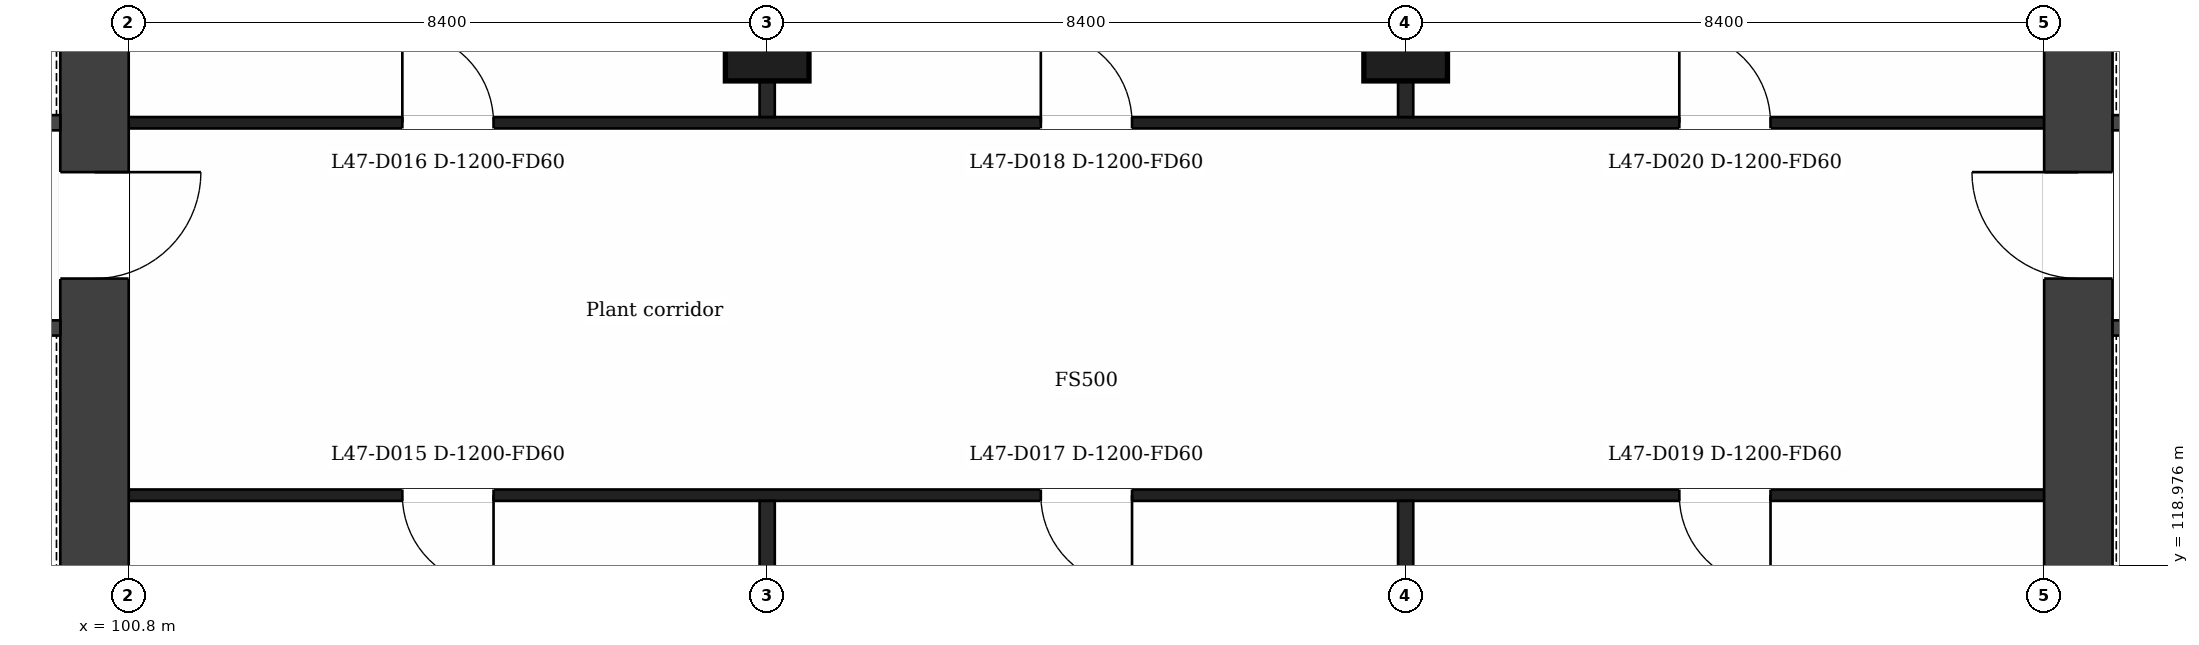
"""IFC4 building model, lengths in metres.
Left out: names, types, materials, properties, quantities, classifications, styles, units other than length and angle.
Written with IfcOpenShell. Run it as: python <this file> out.ifc"""

import sys

from ifc_helpers import new_model, si_unit, direction, frame, frame_2d, origin, origin_2d, place, context, subcontext, project, spatial, rectangle, extrude, element, fill, save


model = new_model("IFC4")
c1 = context("Model", 3, precision=1e-05, world=origin(), true_north=direction((0.0, 1.0)))
c2 = subcontext(c1, "Body", "Model", "MODEL_VIEW")
j1 = project(units=[si_unit("LENGTHUNIT", "METRE"), si_unit("PLANEANGLEUNIT", "RADIAN")], contexts=[c1])
p1 = place(None, origin())
s1 = spatial("IfcSite", under=j1, at=p1, CompositionType="ELEMENT")
p2 = place(p1, origin())
s2 = spatial("IfcBuilding", under=s1, at=p2, CompositionType="ELEMENT")
p3 = place(p2, frame((0.0, 0.0, 197.2)))
s3 = spatial("IfcBuildingStorey", under=s2, at=p3, CompositionType="ELEMENT", Elevation=197.2)
p4 = place(p3, frame((100.35, 131.95, 0.0), z_axis=(0.0, 0.0, 1.0), x_axis=(0.0, -1.0, 0.0)))
e1 = element("IfcWall", 1, at=p4, inside=s3, PredefinedType="SHEAR", context=c2, shape_type="SweptSolid", body=[
    extrude(rectangle(XDim=21.1, YDim=0.9, at=frame_2d((10.55, 0.0))), origin(), (0.0, 0.0, 1.0), 5.0),
])
p5 = place(p4, frame((2.35, 0.0, 0.0)))
e2 = element("IfcOpeningElement", 2, at=p5, cuts=e1, PredefinedType="OPENING", context=c2, shape_type="SweptSolid", body=[
    extrude(rectangle(XDim=1.2, YDim=2.1, at=frame_2d((0.6, 1.05))), frame((0.0, 0.46, 0.0), z_axis=(0.0, -1.0, 0.0), x_axis=(1.0, 0.0, 0.0)), (0.0, 0.0, 1.0), 0.92),
])
p6 = place(p4, frame((7.8, 0.0, 0.0)))
e3 = element("IfcOpeningElement", 3, at=p6, cuts=e1, PredefinedType="OPENING", context=c2, shape_type="SweptSolid", body=[
    extrude(rectangle(XDim=1.4, YDim=2.1, at=frame_2d((0.7, 1.05))), frame((0.0, 0.46, 0.0), z_axis=(0.0, -1.0, 0.0), x_axis=(1.0, 0.0, 0.0)), (0.0, 0.0, 1.0), 0.92),
])
p7 = place(p3, frame((126.45, 110.85, 0.0), z_axis=(0.0, 0.0, 1.0), x_axis=(0.0, 1.0, 0.0)))
e4 = element("IfcWall", 4, at=p7, inside=s3, PredefinedType="SHEAR", context=c2, shape_type="SweptSolid", body=[
    extrude(rectangle(XDim=21.1, YDim=0.9, at=frame_2d((10.55, 0.0))), origin(), (0.0, 0.0, 1.0), 5.0),
])
p8 = place(p7, frame((1.05, 0.0, 0.0)))
e5 = element("IfcOpeningElement", 5, at=p8, cuts=e4, PredefinedType="OPENING", context=c2, shape_type="SweptSolid", body=[
    extrude(rectangle(XDim=1.2, YDim=2.1, at=frame_2d((0.6, 1.05))), frame((0.0, 0.46, 0.0), z_axis=(0.0, -1.0, 0.0), x_axis=(1.0, 0.0, 0.0)), (0.0, 0.0, 1.0), 0.92),
])
p9 = place(p7, frame((11.9, 0.0, 0.0)))
e6 = element("IfcOpeningElement", 6, at=p9, cuts=e4, PredefinedType="OPENING", context=c2, shape_type="SweptSolid", body=[
    extrude(rectangle(XDim=1.4, YDim=2.1, at=frame_2d((0.7, 1.05))), frame((0.0, 0.46, 0.0), z_axis=(0.0, -1.0, 0.0), x_axis=(1.0, 0.0, 0.0)), (0.0, 0.0, 1.0), 0.92),
])
for number, where, z_axis, x_axis in (
    (7, (109.2, 125.9, 0.0), (0.0, 0.0, 1.0), (1.0, 0.0, 0.0)),
    (8, (117.6, 125.9, 0.0), (0.0, 0.0, 1.0), (1.0, 0.0, 0.0)),
):
    element("IfcColumn", number, at=place(p3, frame(where, z_axis=z_axis, x_axis=x_axis)), inside=s3, PredefinedType="COLUMN", context=c2, shape_type="SweptSolid", body=[
        extrude(rectangle(XDim=1.1, YDim=1.1, at=origin_2d()), origin(), (0.0, 0.0, 1.0), 5.0),
    ])
p10 = place(p3, frame((100.8, 119.9, 0.0), z_axis=(0.0, 0.0, 1.0), x_axis=(1.0, 0.0, 0.0)))
e9 = element("IfcWall", 9, at=p10, inside=s3, PredefinedType="PARTITIONING", context=c2, shape_type="SweptSolid", body=[
    extrude(rectangle(XDim=25.2, YDim=0.15, at=frame_2d((12.6, 0.0))), origin(), (0.0, 0.0, 1.0), 4.68),
])
p11 = place(p10, frame((3.6, 0.0, 0.0)))
e10 = element("IfcOpeningElement", 10, at=p11, cuts=e9, PredefinedType="OPENING", context=c2, shape_type="SweptSolid", body=[
    extrude(rectangle(XDim=1.2, YDim=2.1, at=frame_2d((0.6, 1.05))), frame((0.0, 0.085, 0.0), z_axis=(0.0, -1.0, 0.0), x_axis=(1.0, 0.0, 0.0)), (0.0, 0.0, 1.0), 0.17),
])
p12 = place(p10, frame((12.0, 0.0, 0.0)))
e11 = element("IfcOpeningElement", 11, at=p12, cuts=e9, PredefinedType="OPENING", context=c2, shape_type="SweptSolid", body=[
    extrude(rectangle(XDim=1.2, YDim=2.1, at=frame_2d((0.6, 1.05))), frame((0.0, 0.085, 0.0), z_axis=(0.0, -1.0, 0.0), x_axis=(1.0, 0.0, 0.0)), (0.0, 0.0, 1.0), 0.17),
])
p13 = place(p10, frame((20.4, 0.0, 0.0)))
e12 = element("IfcOpeningElement", 12, at=p13, cuts=e9, PredefinedType="OPENING", context=c2, shape_type="SweptSolid", body=[
    extrude(rectangle(XDim=1.2, YDim=2.1, at=frame_2d((0.6, 1.05))), frame((0.0, 0.085, 0.0), z_axis=(0.0, -1.0, 0.0), x_axis=(1.0, 0.0, 0.0)), (0.0, 0.0, 1.0), 0.17),
])
p14 = place(p3, frame((95.227, 122.1, 0.0), z_axis=(0.0, 0.0, 1.0), x_axis=(1.0, 0.0, 0.0)))
e13 = element("IfcWall", 13, at=p14, inside=s3, PredefinedType="PARTITIONING", context=c2, shape_type="SweptSolid", body=[
    extrude(rectangle(XDim=4.673, YDim=0.2, at=frame_2d((2.336, 0.0))), origin(), (0.0, 0.0, 1.0), 4.68),
])
p15 = place(p14, frame((0.618, 0.0, 0.0)))
e14 = element("IfcOpeningElement", 14, at=p15, cuts=e13, PredefinedType="OPENING", context=c2, shape_type="SweptSolid", body=[
    extrude(rectangle(XDim=1.1, YDim=2.1, at=frame_2d((0.55, 1.05))), frame((0.0, 0.11, 0.0), z_axis=(0.0, -1.0, 0.0), x_axis=(1.0, 0.0, 0.0)), (0.0, 0.0, 1.0), 0.22),
])
p16 = place(p14, frame((3.089, 0.0, 0.0)))
e15 = element("IfcOpeningElement", 15, at=p16, cuts=e13, PredefinedType="OPENING", context=c2, shape_type="SweptSolid", body=[
    extrude(rectangle(XDim=1.1, YDim=2.1, at=frame_2d((0.55, 1.05))), frame((0.0, 0.11, 0.0), z_axis=(0.0, -1.0, 0.0), x_axis=(1.0, 0.0, 0.0)), (0.0, 0.0, 1.0), 0.22),
])
p17 = place(p3, frame((126.9, 122.1, 0.0), z_axis=(0.0, 0.0, 1.0), x_axis=(1.0, 0.0, 0.0)))
e16 = element("IfcWall", 16, at=p17, inside=s3, PredefinedType="PARTITIONING", context=c2, shape_type="SweptSolid", body=[
    extrude(rectangle(XDim=4.673, YDim=0.2, at=frame_2d((2.336, 0.0))), origin(), (0.0, 0.0, 1.0), 4.68),
])
p18 = place(p17, frame((2.901, 0.0, 0.0)))
e17 = element("IfcOpeningElement", 17, at=p18, cuts=e16, PredefinedType="OPENING", context=c2, shape_type="SweptSolid", body=[
    extrude(rectangle(XDim=1.1, YDim=2.1, at=frame_2d((0.55, 1.05))), frame((0.0, 0.11, 0.0), z_axis=(0.0, -1.0, 0.0), x_axis=(1.0, 0.0, 0.0)), (0.0, 0.0, 1.0), 0.22),
])
p19 = place(p17, frame((0.752, 0.0, 0.0)))
e18 = element("IfcOpeningElement", 18, at=p19, cuts=e16, PredefinedType="OPENING", context=c2, shape_type="SweptSolid", body=[
    extrude(rectangle(XDim=1.1, YDim=2.1, at=frame_2d((0.55, 1.05))), frame((0.0, 0.11, 0.0), z_axis=(0.0, -1.0, 0.0), x_axis=(1.0, 0.0, 0.0)), (0.0, 0.0, 1.0), 0.22),
])
p20 = place(p3, frame((92.702, 124.8, 0.0), z_axis=(0.0, 0.0, 1.0), x_axis=(1.0, 0.0, 0.0)))
e19 = element("IfcWall", 19, at=p20, inside=s3, PredefinedType="PARTITIONING", context=c2, shape_type="SweptSolid", body=[
    extrude(rectangle(XDim=7.198, YDim=0.2, at=frame_2d((3.599, 0.0))), origin(), (0.0, 0.0, 1.0), 4.68),
])
p21 = place(p20, frame((5.469, 0.0, 0.0)))
e20 = element("IfcOpeningElement", 20, at=p21, cuts=e19, PredefinedType="OPENING", context=c2, shape_type="SweptSolid", body=[
    extrude(rectangle(XDim=1.1, YDim=2.1, at=frame_2d((0.55, 1.05))), frame((0.0, 0.11, 0.0), z_axis=(0.0, -1.0, 0.0), x_axis=(1.0, 0.0, 0.0)), (0.0, 0.0, 1.0), 0.22),
])
p22 = place(p3, frame((126.9, 124.8, 0.0), z_axis=(0.0, 0.0, 1.0), x_axis=(1.0, 0.0, 0.0)))
e21 = element("IfcWall", 21, at=p22, inside=s3, PredefinedType="PARTITIONING", context=c2, shape_type="SweptSolid", body=[
    extrude(rectangle(XDim=4.715, YDim=0.2, at=frame_2d((2.358, 0.0))), origin(), (0.0, 0.0, 1.0), 4.68),
])
p23 = place(p22, frame((0.573, 0.0, 0.0)))
e22 = element("IfcOpeningElement", 22, at=p23, cuts=e21, PredefinedType="OPENING", context=c2, shape_type="SweptSolid", body=[
    extrude(rectangle(XDim=1.1, YDim=2.1, at=frame_2d((0.55, 1.05))), frame((0.0, 0.11, 0.0), z_axis=(0.0, -1.0, 0.0), x_axis=(1.0, 0.0, 0.0)), (0.0, 0.0, 1.0), 0.22),
])
p24 = place(p3, frame((100.8, 124.8, 0.0), z_axis=(0.0, 0.0, 1.0), x_axis=(1.0, 0.0, 0.0)))
e23 = element("IfcWall", 23, at=p24, inside=s3, PredefinedType="PARTITIONING", context=c2, shape_type="SweptSolid", body=[
    extrude(rectangle(XDim=25.2, YDim=0.15, at=frame_2d((12.6, 0.0))), origin(), (0.0, 0.0, 1.0), 4.68),
])
p25 = place(p24, frame((3.6, 0.0, 0.0)))
e24 = element("IfcOpeningElement", 24, at=p25, cuts=e23, PredefinedType="OPENING", context=c2, shape_type="SweptSolid", body=[
    extrude(rectangle(XDim=1.2, YDim=2.1, at=frame_2d((0.6, 1.05))), frame((0.0, 0.085, 0.0), z_axis=(0.0, -1.0, 0.0), x_axis=(1.0, 0.0, 0.0)), (0.0, 0.0, 1.0), 0.17),
])
p26 = place(p24, frame((12.0, 0.0, 0.0)))
e25 = element("IfcOpeningElement", 25, at=p26, cuts=e23, PredefinedType="OPENING", context=c2, shape_type="SweptSolid", body=[
    extrude(rectangle(XDim=1.2, YDim=2.1, at=frame_2d((0.6, 1.05))), frame((0.0, 0.085, 0.0), z_axis=(0.0, -1.0, 0.0), x_axis=(1.0, 0.0, 0.0)), (0.0, 0.0, 1.0), 0.17),
])
p27 = place(p24, frame((20.4, 0.0, 0.0)))
e26 = element("IfcOpeningElement", 26, at=p27, cuts=e23, PredefinedType="OPENING", context=c2, shape_type="SweptSolid", body=[
    extrude(rectangle(XDim=1.2, YDim=2.1, at=frame_2d((0.6, 1.05))), frame((0.0, 0.085, 0.0), z_axis=(0.0, -1.0, 0.0), x_axis=(1.0, 0.0, 0.0)), (0.0, 0.0, 1.0), 0.17),
])
p28 = place(p3, frame((109.2, 110.475, 0.0), z_axis=(0.0, 0.0, 1.0), x_axis=(0.0, 1.0, 0.0)))
e27 = element("IfcWall", 27, at=p28, inside=s3, PredefinedType="PARTITIONING", context=c2, shape_type="SweptSolid", body=[
    extrude(rectangle(XDim=9.35, YDim=0.2, at=frame_2d((4.675, 0.0))), origin(), (0.0, 0.0, 1.0), 4.68),
])
p29 = place(p3, frame((109.2, 124.875, 0.0), z_axis=(0.0, 0.0, 1.0), x_axis=(0.0, 1.0, 0.0)))
e28 = element("IfcWall", 28, at=p29, inside=s3, PredefinedType="PARTITIONING", context=c2, shape_type="SweptSolid", body=[
    extrude(rectangle(XDim=7.45, YDim=0.2, at=frame_2d((3.725, 0.0))), origin(), (0.0, 0.0, 1.0), 4.68),
])
p30 = place(p3, frame((117.6, 110.475, 0.0), z_axis=(0.0, 0.0, 1.0), x_axis=(0.0, 1.0, 0.0)))
e29 = element("IfcWall", 29, at=p30, inside=s3, PredefinedType="PARTITIONING", context=c2, shape_type="SweptSolid", body=[
    extrude(rectangle(XDim=9.35, YDim=0.2, at=frame_2d((4.675, 0.0))), origin(), (0.0, 0.0, 1.0), 4.68),
])
p31 = place(p3, frame((117.6, 124.875, 0.0), z_axis=(0.0, 0.0, 1.0), x_axis=(0.0, 1.0, 0.0)))
e30 = element("IfcWall", 30, at=p31, inside=s3, PredefinedType="PARTITIONING", context=c2, shape_type="SweptSolid", body=[
    extrude(rectangle(XDim=7.45, YDim=0.2, at=frame_2d((3.725, 0.0))), origin(), (0.0, 0.0, 1.0), 4.68),
])
p32 = place(p11, origin())
e31 = element("IfcDoor", 31, at=p32, inside=s3, OperationType="SINGLE_SWING_RIGHT", PredefinedType="DOOR", context=c2, shape_type="SweptSolid", body=[
    extrude(rectangle(XDim=1.2, YDim=2.1, at=frame_2d((0.6, 1.05))), frame((0.0, 0.025, 0.0), z_axis=(0.0, -1.0, 0.0), x_axis=(1.0, 0.0, 0.0)), (0.0, 0.0, 1.0), 0.05),
])
fill(e10, e31)
p33 = place(p25, origin())
e32 = element("IfcDoor", 32, at=p33, inside=s3, OperationType="SINGLE_SWING_LEFT", PredefinedType="DOOR", context=c2, shape_type="SweptSolid", body=[
    extrude(rectangle(XDim=1.2, YDim=2.1, at=frame_2d((0.6, 1.05))), frame((0.0, 0.025, 0.0), z_axis=(0.0, -1.0, 0.0), x_axis=(1.0, 0.0, 0.0)), (0.0, 0.0, 1.0), 0.05),
])
fill(e24, e32)
p34 = place(p12, origin())
e33 = element("IfcDoor", 33, at=p34, inside=s3, OperationType="SINGLE_SWING_RIGHT", PredefinedType="DOOR", context=c2, shape_type="SweptSolid", body=[
    extrude(rectangle(XDim=1.2, YDim=2.1, at=frame_2d((0.6, 1.05))), frame((0.0, 0.025, 0.0), z_axis=(0.0, -1.0, 0.0), x_axis=(1.0, 0.0, 0.0)), (0.0, 0.0, 1.0), 0.05),
])
fill(e11, e33)
p35 = place(p26, origin())
e34 = element("IfcDoor", 34, at=p35, inside=s3, OperationType="SINGLE_SWING_LEFT", PredefinedType="DOOR", context=c2, shape_type="SweptSolid", body=[
    extrude(rectangle(XDim=1.2, YDim=2.1, at=frame_2d((0.6, 1.05))), frame((0.0, 0.025, 0.0), z_axis=(0.0, -1.0, 0.0), x_axis=(1.0, 0.0, 0.0)), (0.0, 0.0, 1.0), 0.05),
])
fill(e25, e34)
p36 = place(p13, origin())
e35 = element("IfcDoor", 35, at=p36, inside=s3, OperationType="SINGLE_SWING_RIGHT", PredefinedType="DOOR", context=c2, shape_type="SweptSolid", body=[
    extrude(rectangle(XDim=1.2, YDim=2.1, at=frame_2d((0.6, 1.05))), frame((0.0, 0.025, 0.0), z_axis=(0.0, -1.0, 0.0), x_axis=(1.0, 0.0, 0.0)), (0.0, 0.0, 1.0), 0.05),
])
fill(e12, e35)
p37 = place(p27, origin())
e36 = element("IfcDoor", 36, at=p37, inside=s3, OperationType="SINGLE_SWING_LEFT", PredefinedType="DOOR", context=c2, shape_type="SweptSolid", body=[
    extrude(rectangle(XDim=1.2, YDim=2.1, at=frame_2d((0.6, 1.05))), frame((0.0, 0.025, 0.0), z_axis=(0.0, -1.0, 0.0), x_axis=(1.0, 0.0, 0.0)), (0.0, 0.0, 1.0), 0.05),
])
fill(e26, e36)
p38 = place(p6, origin())
e37 = element("IfcDoor", 37, at=p38, inside=s3, OperationType="SINGLE_SWING_LEFT", PredefinedType="DOOR", context=c2, shape_type="SweptSolid", body=[
    extrude(rectangle(XDim=1.4, YDim=2.1, at=frame_2d((0.7, 1.05))), frame((0.0, 0.025, 0.0), z_axis=(0.0, -1.0, 0.0), x_axis=(1.0, 0.0, 0.0)), (0.0, 0.0, 1.0), 0.05),
])
fill(e3, e37)
p39 = place(p9, origin())
e38 = element("IfcDoor", 38, at=p39, inside=s3, OperationType="SINGLE_SWING_RIGHT", PredefinedType="DOOR", context=c2, shape_type="SweptSolid", body=[
    extrude(rectangle(XDim=1.4, YDim=2.1, at=frame_2d((0.7, 1.05))), frame((0.0, 0.025, 0.0), z_axis=(0.0, -1.0, 0.0), x_axis=(1.0, 0.0, 0.0)), (0.0, 0.0, 1.0), 0.05),
])
fill(e6, e38)
save(model, sys.argv[1])
